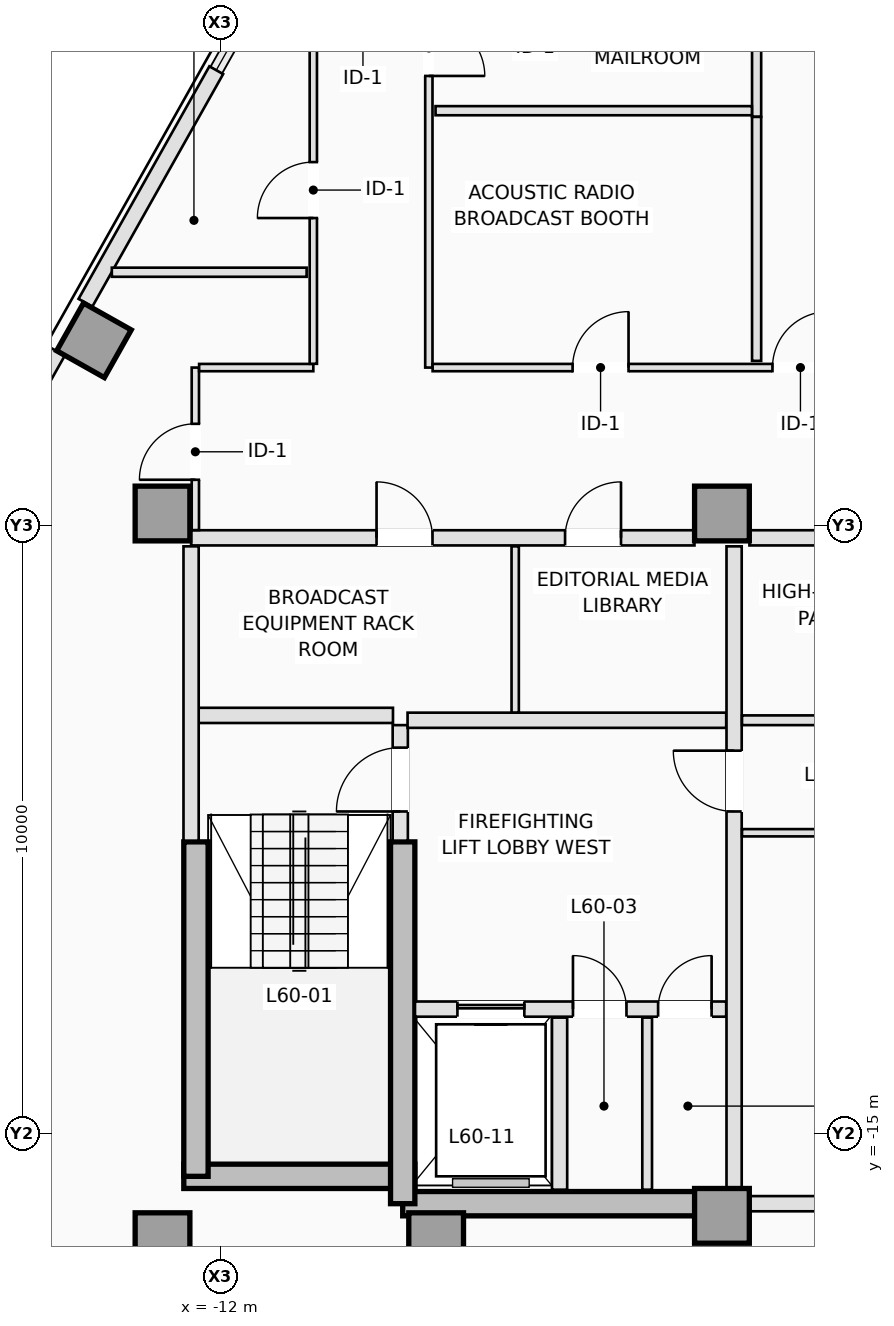
"""IFC4 building model, lengths in metres.
Left out: names, types, materials, properties, quantities, classifications, styles, units other than length and angle.
Written with IfcOpenShell. Run it as: python <this file> out.ifc"""

import sys

from ifc_helpers import new_model, si_unit, direction, frame, frame_2d, origin, origin_2d, place, context, subcontext, project, spatial, rectangle, extrude, element, fill, save


model = new_model("IFC4")
c1 = context("Model", 3, precision=1e-05, world=origin(), true_north=direction((0.0, 1.0)))
c2 = subcontext(c1, "Body", "Model", "MODEL_VIEW")
j1 = project(units=[si_unit("LENGTHUNIT", "METRE"), si_unit("PLANEANGLEUNIT", "RADIAN")], contexts=[c1])
p1 = place(None, origin())
s1 = spatial("IfcSite", under=j1, at=p1, CompositionType="ELEMENT")
p2 = place(p1, origin())
s2 = spatial("IfcBuilding", under=s1, at=p2, CompositionType="ELEMENT")
p3 = place(p2, frame((0.0, 0.0, 218.4)))
s3 = spatial("IfcBuildingStorey", under=s2, at=p3, CompositionType="ELEMENT", Elevation=218.4)
p4 = place(p3, frame((-12.6, -15.7, 0.0), z_axis=(0.0, 0.0, 1.0), x_axis=(1.0, 0.0, 0.0)))
e1 = element("IfcWall", 1, at=p4, inside=s3, PredefinedType="SHEAR", context=c2, shape_type="SweptSolid", body=[
    extrude(rectangle(XDim=3.8, YDim=0.4, at=frame_2d((1.9, 0.0))), origin(), (0.0, 0.0, 1.0), 3.5),
])
p5 = place(p3, frame((-9.0, -16.15, 0.0), z_axis=(0.0, 0.0, 1.0), x_axis=(1.0, 0.0, 0.0)))
e2 = element("IfcWall", 2, at=p5, inside=s3, PredefinedType="SHEAR", context=c2, shape_type="SweptSolid", body=[
    extrude(rectangle(XDim=5.25, YDim=0.4, at=frame_2d((2.625, 0.0))), origin(), (0.0, 0.0, 1.0), 3.5),
])
p6 = place(p3, frame((-12.4, -15.7, 0.0), z_axis=(0.0, 0.0, 1.0), x_axis=(0.0, 1.0, 0.0)))
e3 = element("IfcWall", 3, at=p6, inside=s3, PredefinedType="SHEAR", context=c2, shape_type="SweptSolid", body=[
    extrude(rectangle(XDim=5.5, YDim=0.4, at=frame_2d((2.75, 0.0))), origin(), (0.0, 0.0, 1.0), 3.5),
])
p7 = place(p3, frame((-9.0, -16.15, 0.0), z_axis=(0.0, 0.0, 1.0), x_axis=(0.0, 1.0, 0.0)))
e4 = element("IfcWall", 4, at=p7, inside=s3, PredefinedType="SHEAR", context=c2, shape_type="SweptSolid", body=[
    extrude(rectangle(XDim=5.95, YDim=0.4, at=frame_2d((2.975, 0.0))), origin(), (0.0, 0.0, 1.0), 3.5),
])
for number, where, z_axis, x_axis in (
    (5, (-12.95, -16.75, 0.0), (0.0, 0.0, 1.0), (1.0, 0.0, 0.0)),
    (6, (-8.45, -16.75, 0.0), (0.0, 0.0, 1.0), (1.0, 0.0, 0.0)),
    (7, (-3.75, -16.35, 0.0), (0.0, 0.0, 1.0), (1.0, 0.0, 0.0)),
    (8, (-12.95, -4.8, 0.0), (0.0, 0.0, 1.0), (1.0, 0.0, 0.0)),
    (9, (-3.75, -4.8, 0.0), (0.0, 0.0, 1.0), (1.0, 0.0, 0.0)),
    (10, (-14.077, -1.952, 0.0), (0.0, 0.0, 1.0), (-0.872, 0.49, 0.0)),
):
    element("IfcColumn", number, at=place(p3, frame(where, z_axis=z_axis, x_axis=x_axis)), inside=s3, PredefinedType="COLUMN", context=c2, shape_type="SweptSolid", body=[
        extrude(rectangle(XDim=0.9, YDim=0.9, at=origin_2d()), origin(), (0.0, 0.0, 1.0), 3.5),
    ])
p8 = place(p3, frame((-19.844, -11.337, 0.0), z_axis=(0.0, 0.0, 1.0), x_axis=(0.490246958575, 0.871583570066, 0.0)))
e11 = element("IfcWall", 11, at=p8, inside=s3, PredefinedType="STANDARD", context=c2, shape_type="SweptSolid", body=[
    extrude(rectangle(XDim=10.552, YDim=0.26, at=frame_2d((5.276, 0.0))), origin(), (0.0, 0.0, 1.0), 3.25),
])
p9 = place(p3, frame((-14.217, -1.334, 0.0), z_axis=(0.0, 0.0, 1.0), x_axis=(0.490261239633, 0.871575537125, 0.0)))
e12 = element("IfcWall", 12, at=p9, inside=s3, PredefinedType="STANDARD", context=c2, shape_type="SweptSolid", body=[
    extrude(rectangle(XDim=4.388, YDim=0.26, at=frame_2d((2.194, 0.0))), origin(), (0.0, 0.0, 1.0), 3.25),
])
p10 = place(p3, frame((-9.04, -10.18, 0.0), z_axis=(0.0, 0.0, 1.0), x_axis=(0.0, 1.0, 0.0)))
e13 = element("IfcWall", 13, at=p10, inside=s3, PredefinedType="PARTITIONING", context=c2, shape_type="SweptSolid", body=[
    extrude(rectangle(XDim=1.9, YDim=0.25, at=frame_2d((0.95, 0.0))), origin(), (0.0, 0.0, 1.0), 3.25),
])
p11 = place(p10, frame((0.48, 0.0, 0.0)))
e14 = element("IfcOpeningElement", 14, at=p11, cuts=e13, PredefinedType="OPENING", context=c2, shape_type="SweptSolid", body=[
    extrude(rectangle(XDim=1.05, YDim=2.15, at=frame_2d((0.525, 1.075))), frame((0.0, 0.135, 0.0), z_axis=(0.0, -1.0, 0.0), x_axis=(1.0, 0.0, 0.0)), (0.0, 0.0, 1.0), 0.27),
])
p12 = place(p3, frame((-12.38, -8.12, 0.0), z_axis=(0.0, 0.0, 1.0), x_axis=(1.0, 0.0, 0.0)))
e15 = element("IfcWall", 15, at=p12, inside=s3, PredefinedType="PARTITIONING", context=c2, shape_type="SweptSolid", body=[
    extrude(rectangle(XDim=3.22, YDim=0.25, at=frame_2d((1.61, 0.0))), origin(), (0.0, 0.0, 1.0), 3.25),
])
p13 = place(p3, frame((-12.48, -10.18, 0.0), z_axis=(0.0, 0.0, 1.0), x_axis=(0.0, 1.0, 0.0)))
e16 = element("IfcWall", 16, at=p13, inside=s3, PredefinedType="PARTITIONING", context=c2, shape_type="SweptSolid", body=[
    extrude(rectangle(XDim=4.84, YDim=0.25, at=frame_2d((2.42, 0.0))), origin(), (0.0, 0.0, 1.0), 3.25),
])
p14 = place(p3, frame((-8.798, -12.95, 0.0), z_axis=(0.0, 0.0, 1.0), x_axis=(1.0, 0.0, 0.0)))
e17 = element("IfcWall", 17, at=p14, inside=s3, PredefinedType="PARTITIONING", context=c2, shape_type="SweptSolid", body=[
    extrude(rectangle(XDim=5.118, YDim=0.25, at=frame_2d((2.559, 0.0))), origin(), (0.0, 0.0, 1.0), 3.25),
])
p15 = place(p14, frame((0.698, 0.0, 0.0)))
e18 = element("IfcOpeningElement", 18, at=p15, cuts=e17, PredefinedType="OPENING", context=c2, shape_type="SweptSolid", body=[
    extrude(rectangle(XDim=1.1, YDim=2.15, at=frame_2d((0.55, 1.075))), frame((0.0, 0.135, 0.0), z_axis=(0.0, -1.0, 0.0), x_axis=(1.0, 0.0, 0.0)), (0.0, 0.0, 1.0), 0.27),
])
p16 = place(p14, frame((2.598, 0.0, 0.0)))
e19 = element("IfcOpeningElement", 19, at=p16, cuts=e17, PredefinedType="OPENING", context=c2, shape_type="SweptSolid", body=[
    extrude(rectangle(XDim=0.88, YDim=2.1, at=frame_2d((0.44, 1.05))), frame((0.0, 0.135, 0.0), z_axis=(0.0, -1.0, 0.0), x_axis=(1.0, 0.0, 0.0)), (0.0, 0.0, 1.0), 0.27),
])
p17 = place(p14, frame((3.998, 0.0, 0.0)))
e20 = element("IfcOpeningElement", 20, at=p17, cuts=e17, PredefinedType="OPENING", context=c2, shape_type="SweptSolid", body=[
    extrude(rectangle(XDim=0.88, YDim=2.1, at=frame_2d((0.44, 1.05))), frame((0.0, 0.135, 0.0), z_axis=(0.0, -1.0, 0.0), x_axis=(1.0, 0.0, 0.0)), (0.0, 0.0, 1.0), 0.27),
])
p18 = place(p3, frame((-6.42, -15.92, 0.0), z_axis=(0.0, 0.0, 1.0), x_axis=(0.0, 1.0, 0.0)))
e21 = element("IfcWall", 21, at=p18, inside=s3, PredefinedType="PARTITIONING", context=c2, shape_type="SweptSolid", body=[
    extrude(rectangle(XDim=2.83, YDim=0.25, at=frame_2d((1.415, 0.0))), origin(), (0.0, 0.0, 1.0), 3.25),
])
p19 = place(p3, frame((-4.98, -15.92, 0.0), z_axis=(0.0, 0.0, 1.0), x_axis=(0.0, 1.0, 0.0)))
e22 = element("IfcWall", 22, at=p19, inside=s3, PredefinedType="PARTITIONING", context=c2, shape_type="SweptSolid", body=[
    extrude(rectangle(XDim=2.83, YDim=0.16, at=frame_2d((1.415, 0.0))), origin(), (0.0, 0.0, 1.0), 3.25),
])
p20 = place(p3, frame((-8.92, -8.2, 0.0), z_axis=(0.0, 0.0, 1.0), x_axis=(1.0, 0.0, 0.0)))
e23 = element("IfcWall", 23, at=p20, inside=s3, PredefinedType="PARTITIONING", context=c2, shape_type="SweptSolid", body=[
    extrude(rectangle(XDim=5.24, YDim=0.25, at=frame_2d((2.62, 0.0))), origin(), (0.0, 0.0, 1.0), 3.25),
])
p21 = place(p3, frame((-3.55, -15.898, 0.0), z_axis=(0.0, 0.0, 1.0), x_axis=(0.0, 1.0, 0.0)))
e24 = element("IfcWall", 24, at=p21, inside=s3, PredefinedType="PARTITIONING", context=c2, shape_type="SweptSolid", body=[
    extrude(rectangle(XDim=10.558, YDim=0.25, at=frame_2d((5.279, 0.0))), origin(), (0.0, 0.0, 1.0), 3.25),
])
p22 = place(p21, frame((6.198, 0.0, 0.0)))
e25 = element("IfcOpeningElement", 25, at=p22, cuts=e24, PredefinedType="OPENING", context=c2, shape_type="SweptSolid", body=[
    extrude(rectangle(XDim=1.0, YDim=2.15, at=frame_2d((0.5, 1.075))), frame((0.0, 0.135, 0.0), z_axis=(0.0, -1.0, 0.0), x_axis=(1.0, 0.0, 0.0)), (0.0, 0.0, 1.0), 0.27),
])
p23 = place(p3, frame((-12.48, -5.2, 0.0), z_axis=(0.0, 0.0, 1.0), x_axis=(1.0, 0.0, 0.0)))
e26 = element("IfcWall", 26, at=p23, inside=s3, PredefinedType="PARTITIONING", context=c2, shape_type="SweptSolid", body=[
    extrude(rectangle(XDim=8.278, YDim=0.25, at=frame_2d((4.139, 0.0))), origin(), (0.0, 0.0, 1.0), 3.25),
])
p24 = place(p23, frame((3.05, 0.0, 0.0)))
e27 = element("IfcOpeningElement", 27, at=p24, cuts=e26, PredefinedType="OPENING", context=c2, shape_type="SweptSolid", body=[
    extrude(rectangle(XDim=0.92, YDim=2.12, at=frame_2d((0.46, 1.06))), frame((0.0, 0.135, 0.0), z_axis=(0.0, -1.0, 0.0), x_axis=(1.0, 0.0, 0.0)), (0.0, 0.0, 1.0), 0.27),
])
p25 = place(p23, frame((6.15, 0.0, 0.0)))
e28 = element("IfcOpeningElement", 28, at=p25, cuts=e26, PredefinedType="OPENING", context=c2, shape_type="SweptSolid", body=[
    extrude(rectangle(XDim=0.92, YDim=2.12, at=frame_2d((0.46, 1.06))), frame((0.0, 0.135, 0.0), z_axis=(0.0, -1.0, 0.0), x_axis=(1.0, 0.0, 0.0)), (0.0, 0.0, 1.0), 0.27),
])
p26 = place(p3, frame((-3.298, -5.2, 0.0), z_axis=(0.0, 0.0, 1.0), x_axis=(1.0, 0.0, 0.0)))
e29 = element("IfcWall", 29, at=p26, inside=s3, PredefinedType="PARTITIONING", context=c2, shape_type="SweptSolid", body=[
    extrude(rectangle(XDim=2.348, YDim=0.25, at=frame_2d((1.174, 0.0))), origin(), (0.0, 0.0, 1.0), 3.25),
])
p27 = place(p3, frame((-7.15, -8.073, 0.0), z_axis=(0.0, 0.0, 1.0), x_axis=(0.0, 1.0, 0.0)))
e30 = element("IfcWall", 30, at=p27, inside=s3, PredefinedType="PARTITIONING", context=c2, shape_type="SweptSolid", body=[
    extrude(rectangle(XDim=2.733, YDim=0.12, at=frame_2d((1.366, 0.0))), origin(), (0.0, 0.0, 1.0), 3.25),
])
p28 = place(p3, frame((-3.298, -16.15, 0.0), z_axis=(0.0, 0.0, 1.0), x_axis=(1.0, 0.0, 0.0)))
e31 = element("IfcWall", 31, at=p28, inside=s3, PredefinedType="PARTITIONING", context=c2, shape_type="SweptSolid", body=[
    extrude(rectangle(XDim=6.596, YDim=0.25, at=frame_2d((3.298, 0.0))), origin(), (0.0, 0.0, 1.0), 2.45),
])
p29 = place(p3, frame((-3.42, -8.2, 0.0), z_axis=(0.0, 0.0, 1.0), x_axis=(1.0, 0.0, 0.0)))
e32 = element("IfcWall", 32, at=p29, inside=s3, PredefinedType="PARTITIONING", context=c2, shape_type="SweptSolid", body=[
    extrude(rectangle(XDim=6.84, YDim=0.16, at=frame_2d((3.42, 0.0))), origin(), (0.0, 0.0, 1.0), 3.25),
])
p30 = place(p29, frame((2.92, 0.0, 0.0)))
e33 = element("IfcOpeningElement", 33, at=p30, cuts=e32, PredefinedType="OPENING", context=c2, shape_type="SweptSolid", body=[
    extrude(rectangle(XDim=1.0, YDim=2.15, at=frame_2d((0.5, 1.075))), frame((0.0, 0.09, 0.0), z_axis=(0.0, -1.0, 0.0), x_axis=(1.0, 0.0, 0.0)), (0.0, 0.0, 1.0), 0.18),
])
p31 = place(p3, frame((-3.42, -10.05, 0.0), z_axis=(0.0, 0.0, 1.0), x_axis=(1.0, 0.0, 0.0)))
e34 = element("IfcWall", 34, at=p31, inside=s3, PredefinedType="PARTITIONING", context=c2, shape_type="SweptSolid", body=[
    extrude(rectangle(XDim=6.84, YDim=0.12, at=frame_2d((3.42, 0.0))), origin(), (0.0, 0.0, 1.0), 3.25),
])
p32 = place(p31, frame((2.95, 0.0, 0.0)))
e35 = element("IfcOpeningElement", 35, at=p32, cuts=e34, PredefinedType="OPENING", context=c2, shape_type="SweptSolid", body=[
    extrude(rectangle(XDim=0.92, YDim=2.12, at=frame_2d((0.46, 1.06))), frame((0.0, 0.07, 0.0), z_axis=(0.0, -1.0, 0.0), x_axis=(1.0, 0.0, 0.0)), (0.0, 0.0, 1.0), 0.14),
])
p33 = place(p3, frame((-12.41, -5.073, 0.0), z_axis=(0.0, 0.0, 1.0), x_axis=(0.0, 1.0, 0.0)))
e36 = element("IfcWall", 36, at=p33, inside=s3, PredefinedType="PARTITIONING", context=c2, shape_type="SweptSolid", body=[
    extrude(rectangle(XDim=2.673, YDim=0.12, at=frame_2d((1.336, 0.0))), origin(), (0.0, 0.0, 1.0), 3.25),
])
p34 = place(p33, frame((0.828, 0.0, 0.0)))
e37 = element("IfcOpeningElement", 37, at=p34, cuts=e36, PredefinedType="OPENING", context=c2, shape_type="SweptSolid", body=[
    extrude(rectangle(XDim=0.92, YDim=2.12, at=frame_2d((0.46, 1.06))), frame((0.0, 0.07, 0.0), z_axis=(0.0, -1.0, 0.0), x_axis=(1.0, 0.0, 0.0)), (0.0, 0.0, 1.0), 0.14),
])
p35 = place(p3, frame((-12.348, -2.4, 0.0), z_axis=(0.0, 0.0, 1.0), x_axis=(1.0, 0.0, 0.0)))
e38 = element("IfcWall", 38, at=p35, inside=s3, PredefinedType="PARTITIONING", context=c2, shape_type="SweptSolid", body=[
    extrude(rectangle(XDim=1.878, YDim=0.12, at=frame_2d((0.939, 0.0))), origin(), (0.0, 0.0, 1.0), 3.25),
])
p36 = place(p3, frame((-10.47, -2.338, 0.0), z_axis=(0.0, 0.0, 1.0), x_axis=(0.0, 1.0, 0.0)))
e39 = element("IfcWall", 39, at=p36, inside=s3, PredefinedType="PARTITIONING", context=c2, shape_type="SweptSolid", body=[
    extrude(rectangle(XDim=5.289, YDim=0.12, at=frame_2d((2.645, 0.0))), origin(), (0.0, 0.0, 1.0), 3.25),
])
p37 = place(p36, frame((2.397, 0.0, 0.0)))
e40 = element("IfcOpeningElement", 40, at=p37, cuts=e39, PredefinedType="OPENING", context=c2, shape_type="SweptSolid", body=[
    extrude(rectangle(XDim=0.92, YDim=2.12, at=frame_2d((0.46, 1.06))), frame((0.0, 0.07, 0.0), z_axis=(0.0, -1.0, 0.0), x_axis=(1.0, 0.0, 0.0)), (0.0, 0.0, 1.0), 0.14),
])
p38 = place(p3, frame((-8.57, 6.203, 0.0), z_axis=(0.0, 0.0, 1.0), x_axis=(0.0, -1.0, 0.0)))
e41 = element("IfcWall", 41, at=p38, inside=s3, PredefinedType="PARTITIONING", context=c2, shape_type="SweptSolid", body=[
    extrude(rectangle(XDim=8.603, YDim=0.12, at=frame_2d((4.301, 0.0))), origin(), (0.0, 0.0, 1.0), 3.25),
])
p39 = place(p38, frame((2.887, 0.0, 0.0)))
e42 = element("IfcOpeningElement", 42, at=p39, cuts=e41, PredefinedType="OPENING", context=c2, shape_type="SweptSolid", body=[
    extrude(rectangle(XDim=0.92, YDim=2.12, at=frame_2d((0.46, 1.06))), frame((0.0, 0.07, 0.0), z_axis=(0.0, -1.0, 0.0), x_axis=(1.0, 0.0, 0.0)), (0.0, 0.0, 1.0), 0.14),
])
p40 = place(p3, frame((-8.508, -2.4, 0.0), z_axis=(0.0, 0.0, 1.0), x_axis=(1.0, 0.0, 0.0)))
e43 = element("IfcWall", 43, at=p40, inside=s3, PredefinedType="PARTITIONING", context=c2, shape_type="SweptSolid", body=[
    extrude(rectangle(XDim=9.746, YDim=0.12, at=frame_2d((4.873, 0.0))), origin(), (0.0, 0.0, 1.0), 2.943),
])
p41 = place(p40, frame((7.789, 0.0, 0.0)))
e44 = element("IfcOpeningElement", 44, at=p41, cuts=e43, PredefinedType="OPENING", context=c2, shape_type="SweptSolid", body=[
    extrude(rectangle(XDim=0.92, YDim=2.12, at=frame_2d((0.46, 1.06))), frame((0.0, 0.07, 0.0), z_axis=(0.0, -1.0, 0.0), x_axis=(1.0, 0.0, 0.0)), (0.0, 0.0, 1.0), 0.14),
])
p42 = place(p40, frame((5.589, 0.0, 0.0)))
e45 = element("IfcOpeningElement", 45, at=p42, cuts=e43, PredefinedType="OPENING", context=c2, shape_type="SweptSolid", body=[
    extrude(rectangle(XDim=0.92, YDim=2.12, at=frame_2d((0.46, 1.06))), frame((0.0, 0.07, 0.0), z_axis=(0.0, -1.0, 0.0), x_axis=(1.0, 0.0, 0.0)), (0.0, 0.0, 1.0), 0.14),
])
p43 = place(p40, frame((2.302, 0.0, 0.0)))
e46 = element("IfcOpeningElement", 46, at=p43, cuts=e43, PredefinedType="OPENING", context=c2, shape_type="SweptSolid", body=[
    extrude(rectangle(XDim=0.92, YDim=2.12, at=frame_2d((0.46, 1.06))), frame((0.0, 0.07, 0.0), z_axis=(0.0, -1.0, 0.0), x_axis=(1.0, 0.0, 0.0)), (0.0, 0.0, 1.0), 0.14),
])
p44 = place(p3, frame((-3.18, 1.724, 0.0), z_axis=(0.0, 0.0, 1.0), x_axis=(0.0, 1.0, 0.0)))
e47 = element("IfcWall", 47, at=p44, inside=s3, PredefinedType="PARTITIONING", context=c2, shape_type="SweptSolid", body=[
    extrude(rectangle(XDim=2.02, YDim=0.15, at=frame_2d((1.01, 0.0))), origin(), (0.0, 0.0, 1.0), 3.25),
])
p45 = place(p3, frame((-3.18, -2.29, 0.0), z_axis=(0.0, 0.0, 1.0), x_axis=(0.0, 1.0, 0.0)))
e48 = element("IfcWall", 48, at=p45, inside=s3, PredefinedType="PARTITIONING", context=c2, shape_type="SweptSolid", body=[
    extrude(rectangle(XDim=4.012, YDim=0.15, at=frame_2d((2.006, 0.0))), origin(), (0.0, 0.0, 1.0), 3.25),
])
p46 = place(p3, frame((-3.257, 1.824, 0.0), z_axis=(0.0, 0.0, 1.0), x_axis=(-1.0, 0.0, 0.0)))
e49 = element("IfcWall", 49, at=p46, inside=s3, PredefinedType="PARTITIONING", context=c2, shape_type="SweptSolid", body=[
    extrude(rectangle(XDim=5.203, YDim=0.15, at=frame_2d((2.602, 0.0))), origin(), (0.0, 0.0, 1.0), 3.25),
])
p47 = place(p3, frame((-10.58, -0.832, 0.0), z_axis=(0.0, 0.0, 1.0), x_axis=(-1.0, 0.0, 0.0)))
e50 = element("IfcWall", 50, at=p47, inside=s3, PredefinedType="PARTITIONING", context=c2, shape_type="SweptSolid", body=[
    extrude(rectangle(XDim=3.203, YDim=0.15, at=frame_2d((1.602, 0.0))), origin(), (0.0, 0.0, 1.0), 3.25),
])
p48 = place(p15, origin())
e51 = element("IfcDoor", 51, at=p48, inside=s3, OperationType="SLIDING_TO_LEFT", PredefinedType="DOOR", context=c2, shape_type="SweptSolid", body=[
    extrude(rectangle(XDim=1.1, YDim=2.15, at=frame_2d((0.55, 1.075))), frame((0.0, 0.025, 0.0), z_axis=(0.0, -1.0, 0.0), x_axis=(1.0, 0.0, 0.0)), (0.0, 0.0, 1.0), 0.05),
])
fill(e18, e51)
p49 = place(p11, origin())
e52 = element("IfcDoor", 52, at=p49, inside=s3, OperationType="SINGLE_SWING_LEFT", PredefinedType="DOOR", context=c2, shape_type="SweptSolid", body=[
    extrude(rectangle(XDim=1.05, YDim=2.15, at=frame_2d((0.525, 1.075))), frame((0.0, 0.025, 0.0), z_axis=(0.0, -1.0, 0.0), x_axis=(1.0, 0.0, 0.0)), (0.0, 0.0, 1.0), 0.05),
])
fill(e14, e52)
p50 = place(p16, origin())
e53 = element("IfcDoor", 53, at=p50, inside=s3, OperationType="SINGLE_SWING_LEFT", PredefinedType="TRAPDOOR", context=c2, shape_type="SweptSolid", body=[
    extrude(rectangle(XDim=0.88, YDim=2.1, at=frame_2d((0.44, 1.05))), frame((0.0, 0.025, 0.0), z_axis=(0.0, -1.0, 0.0), x_axis=(1.0, 0.0, 0.0)), (0.0, 0.0, 1.0), 0.05),
])
fill(e19, e53)
p51 = place(p17, origin())
e54 = element("IfcDoor", 54, at=p51, inside=s3, OperationType="SINGLE_SWING_RIGHT", PredefinedType="TRAPDOOR", context=c2, shape_type="SweptSolid", body=[
    extrude(rectangle(XDim=0.88, YDim=2.1, at=frame_2d((0.44, 1.05))), frame((0.0, 0.025, 0.0), z_axis=(0.0, -1.0, 0.0), x_axis=(1.0, 0.0, 0.0)), (0.0, 0.0, 1.0), 0.05),
])
fill(e20, e54)
p52 = place(p22, origin())
e55 = element("IfcDoor", 55, at=p52, inside=s3, OperationType="SINGLE_SWING_RIGHT", PredefinedType="DOOR", context=c2, shape_type="SweptSolid", body=[
    extrude(rectangle(XDim=1.0, YDim=2.15, at=frame_2d((0.5, 1.075))), frame((0.0, 0.025, 0.0), z_axis=(0.0, -1.0, 0.0), x_axis=(1.0, 0.0, 0.0)), (0.0, 0.0, 1.0), 0.05),
])
fill(e25, e55)
p53 = place(p24, origin())
e56 = element("IfcDoor", 56, at=p53, inside=s3, OperationType="SINGLE_SWING_LEFT", PredefinedType="DOOR", context=c2, shape_type="SweptSolid", body=[
    extrude(rectangle(XDim=0.92, YDim=2.12, at=frame_2d((0.46, 1.06))), frame((0.0, 0.025, 0.0), z_axis=(0.0, -1.0, 0.0), x_axis=(1.0, 0.0, 0.0)), (0.0, 0.0, 1.0), 0.05),
])
fill(e27, e56)
p54 = place(p25, origin())
e57 = element("IfcDoor", 57, at=p54, inside=s3, OperationType="SINGLE_SWING_RIGHT", PredefinedType="DOOR", context=c2, shape_type="SweptSolid", body=[
    extrude(rectangle(XDim=0.92, YDim=2.12, at=frame_2d((0.46, 1.06))), frame((0.0, 0.025, 0.0), z_axis=(0.0, -1.0, 0.0), x_axis=(1.0, 0.0, 0.0)), (0.0, 0.0, 1.0), 0.05),
])
fill(e28, e57)
p55 = place(p42, origin())
e58 = element("IfcDoor", 58, at=p55, inside=s3, OperationType="SINGLE_SWING_RIGHT", PredefinedType="DOOR", context=c2, shape_type="SweptSolid", body=[
    extrude(rectangle(XDim=0.92, YDim=2.12, at=frame_2d((0.46, 1.06))), frame((0.0, 0.025, 0.0), z_axis=(0.0, -1.0, 0.0), x_axis=(1.0, 0.0, 0.0)), (0.0, 0.0, 1.0), 0.05),
])
fill(e45, e58)
p56 = place(p39, origin())
e59 = element("IfcDoor", 59, at=p56, inside=s3, OperationType="SINGLE_SWING_RIGHT", PredefinedType="DOOR", context=c2, shape_type="SweptSolid", body=[
    extrude(rectangle(XDim=0.92, YDim=2.12, at=frame_2d((0.46, 1.06))), frame((0.0, 0.025, 0.0), z_axis=(0.0, -1.0, 0.0), x_axis=(1.0, 0.0, 0.0)), (0.0, 0.0, 1.0), 0.05),
])
fill(e42, e59)
p57 = place(p37, origin())
e60 = element("IfcDoor", 60, at=p57, inside=s3, OperationType="SINGLE_SWING_LEFT", PredefinedType="DOOR", context=c2, shape_type="SweptSolid", body=[
    extrude(rectangle(XDim=0.92, YDim=2.12, at=frame_2d((0.46, 1.06))), frame((0.0, 0.025, 0.0), z_axis=(0.0, -1.0, 0.0), x_axis=(1.0, 0.0, 0.0)), (0.0, 0.0, 1.0), 0.05),
])
fill(e40, e60)
p58 = place(p43, origin())
e61 = element("IfcDoor", 61, at=p58, inside=s3, OperationType="SINGLE_SWING_RIGHT", PredefinedType="DOOR", context=c2, shape_type="SweptSolid", body=[
    extrude(rectangle(XDim=0.92, YDim=2.12, at=frame_2d((0.46, 1.06))), frame((0.0, 0.025, 0.0), z_axis=(0.0, -1.0, 0.0), x_axis=(1.0, 0.0, 0.0)), (0.0, 0.0, 1.0), 0.05),
])
fill(e46, e61)
p59 = place(p34, origin())
e62 = element("IfcDoor", 62, at=p59, inside=s3, OperationType="SINGLE_SWING_LEFT", PredefinedType="DOOR", context=c2, shape_type="SweptSolid", body=[
    extrude(rectangle(XDim=0.92, YDim=2.12, at=frame_2d((0.46, 1.06))), frame((0.0, 0.025, 0.0), z_axis=(0.0, -1.0, 0.0), x_axis=(1.0, 0.0, 0.0)), (0.0, 0.0, 1.0), 0.05),
])
fill(e37, e62)
save(model, sys.argv[1])
